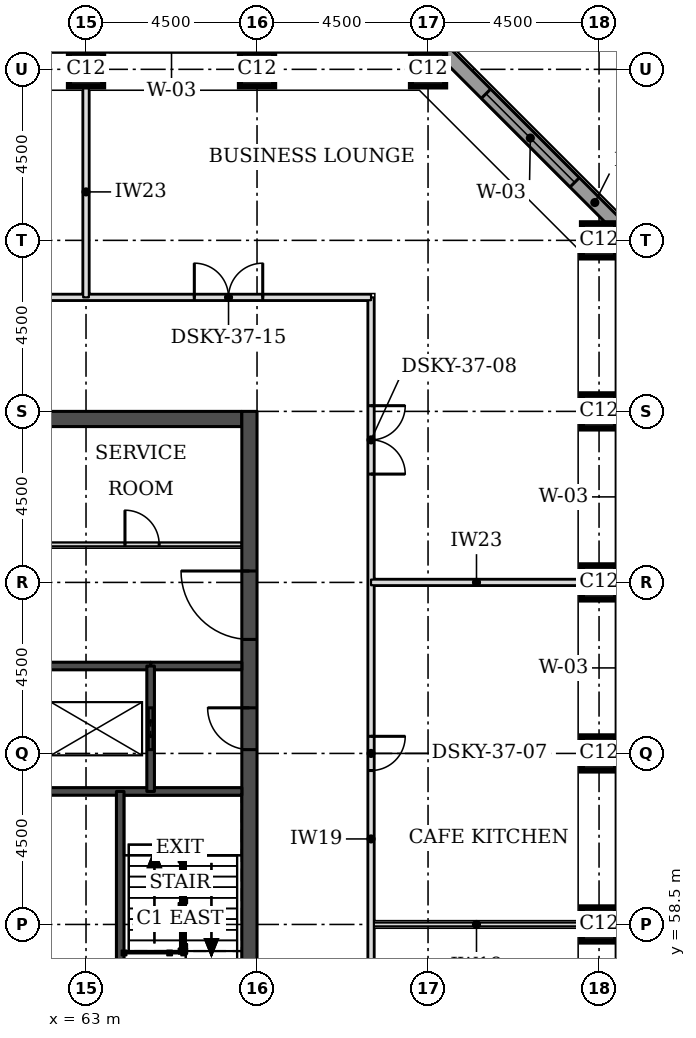
"""IFC4 building model, lengths in metres.
Left out: names, types, materials, properties, quantities, classifications, styles, units other than length and angle.
Written with IfcOpenShell. Run it as: python <this file> out.ifc"""

import sys

from ifc_helpers import new_model, si_unit, direction, frame, frame_2d, origin, origin_2d, place, context, subcontext, project, spatial, rectangle, extrude, element, fill, save


model = new_model("IFC4")
c1 = context("Model", 3, precision=1e-05, world=origin(), true_north=direction((0.0, 1.0)))
c2 = subcontext(c1, "Body", "Model", "MODEL_VIEW")
j1 = project(units=[si_unit("LENGTHUNIT", "METRE"), si_unit("PLANEANGLEUNIT", "RADIAN")], contexts=[c1])
p1 = place(None, origin())
s1 = spatial("IfcSite", under=j1, at=p1, CompositionType="ELEMENT")
p2 = place(p1, origin())
s2 = spatial("IfcBuilding", under=s1, at=p2, CompositionType="ELEMENT")
p3 = place(p2, frame((0.0, 0.0, 143.1)))
s3 = spatial("IfcBuildingStorey", under=s2, at=p3, CompositionType="ELEMENT", Elevation=143.1)
for number, where, z_axis, x_axis in (
    (1, (76.5, 58.5, 0.0), (0.0, 0.0, 1.0), (1.0, 0.0, 0.0)),
    (2, (76.5, 63.0, 0.0), (0.0, 0.0, 1.0), (1.0, 0.0, 0.0)),
    (3, (76.5, 67.5, 0.0), (0.0, 0.0, 1.0), (1.0, 0.0, 0.0)),
    (4, (76.5, 72.0, 0.0), (0.0, 0.0, 1.0), (1.0, 0.0, 0.0)),
    (5, (76.5, 76.5, 0.0), (0.0, 0.0, 1.0), (1.0, 0.0, 0.0)),
    (6, (63.0, 81.0, 0.0), (0.0, 0.0, 1.0), (1.0, 0.0, 0.0)),
    (7, (67.5, 81.0, 0.0), (0.0, 0.0, 1.0), (1.0, 0.0, 0.0)),
    (8, (72.0, 81.0, 0.0), (0.0, 0.0, 1.0), (1.0, 0.0, 0.0)),
):
    element("IfcColumn", number, at=place(p3, frame(where, z_axis=z_axis, x_axis=x_axis)), inside=s3, PredefinedType="COLUMN", context=c2, shape_type="SweptSolid", body=[
        extrude(rectangle(XDim=0.9, YDim=0.9, at=origin_2d()), origin(), (0.0, 0.0, 1.0), 4.6),
    ])
p4 = place(p3, frame((45.4, 71.8, 0.0), z_axis=(0.0, 0.0, 1.0), x_axis=(1.0, 0.0, 0.0)))
e9 = element("IfcWall", 9, at=p4, inside=s3, PredefinedType="SHEAR", context=c2, shape_type="SweptSolid", body=[
    extrude(rectangle(XDim=21.7, YDim=0.4, at=frame_2d((10.85, 0.0))), origin(), (0.0, 0.0, 1.0), 4.6),
])
p5 = place(p3, frame((67.3, 49.5, 0.0), z_axis=(0.0, 0.0, 1.0), x_axis=(0.0, 1.0, 0.0)))
e10 = element("IfcWall", 10, at=p5, inside=s3, PredefinedType="SHEAR", context=c2, shape_type="SweptSolid", body=[
    extrude(rectangle(XDim=22.5, YDim=0.4, at=frame_2d((11.25, 0.0))), origin(), (0.0, 0.0, 1.0), 4.6),
])
p6 = place(p5, frame((4.2, 0.0, 0.0)))
e11 = element("IfcOpeningElement", 11, at=p6, cuts=e10, PredefinedType="OPENING", context=c2, shape_type="SweptSolid", body=[
    extrude(rectangle(XDim=1.8, YDim=2.1, at=frame_2d((0.9, 1.05))), frame((0.0, 0.21, 0.0), z_axis=(0.0, -1.0, 0.0), x_axis=(1.0, 0.0, 0.0)), (0.0, 0.0, 1.0), 0.42),
])
p7 = place(p5, frame((6.9, 0.0, 0.0)))
e12 = element("IfcOpeningElement", 12, at=p7, cuts=e10, PredefinedType="OPENING", context=c2, shape_type="SweptSolid", body=[
    extrude(rectangle(XDim=1.1, YDim=2.1, at=frame_2d((0.55, 1.05))), frame((0.0, 0.21, 0.0), z_axis=(0.0, -1.0, 0.0), x_axis=(1.0, 0.0, 0.0)), (0.0, 0.0, 1.0), 0.42),
])
p8 = place(p5, frame((13.6, 0.0, 0.0)))
e13 = element("IfcOpeningElement", 13, at=p8, cuts=e10, PredefinedType="OPENING", context=c2, shape_type="SweptSolid", body=[
    extrude(rectangle(XDim=1.1, YDim=2.1, at=frame_2d((0.55, 1.05))), frame((0.0, 0.21, 0.0), z_axis=(0.0, -1.0, 0.0), x_axis=(1.0, 0.0, 0.0)), (0.0, 0.0, 1.0), 0.42),
])
p9 = place(p5, frame((16.5, 0.0, 0.0)))
e14 = element("IfcOpeningElement", 14, at=p9, cuts=e10, PredefinedType="OPENING", context=c2, shape_type="SweptSolid", body=[
    extrude(rectangle(XDim=1.8, YDim=2.1, at=frame_2d((0.9, 1.05))), frame((0.0, 0.21, 0.0), z_axis=(0.0, -1.0, 0.0), x_axis=(1.0, 0.0, 0.0)), (0.0, 0.0, 1.0), 0.42),
])
p10 = place(p3, frame((77.176, 76.708, 0.0), z_axis=(0.0, 0.0, 1.0), x_axis=(-0.707106781187, 0.707106781187, 0.0)))
e15 = element("IfcWall", 15, at=p10, inside=s3, PredefinedType="STANDARD", context=c2, shape_type="SweptSolid", body=[
    extrude(rectangle(XDim=7.027, YDim=0.35, at=frame_2d((3.513, 0.0))), origin(), (0.0, 0.0, 1.0), 4.425),
])
p11 = place(p10, frame((1.863, 0.0, 0.9)))
e16 = element("IfcOpeningElement", 16, at=p11, cuts=e15, PredefinedType="OPENING", context=c2, shape_type="SweptSolid", body=[
    extrude(rectangle(XDim=3.3, YDim=2.7, at=frame_2d((1.65, 1.35))), frame((0.0, 0.185, 0.0), z_axis=(0.0, -1.0, 0.0), x_axis=(1.0, 0.0, 0.0)), (0.0, 0.0, 1.0), 0.37),
])
p12 = place(p3, frame((70.5, 58.5, 0.0), z_axis=(0.0, 0.0, 1.0), x_axis=(1.0, 0.0, 0.0)))
e17 = element("IfcWall", 17, at=p12, inside=s3, PredefinedType="PARTITIONING", context=c2, shape_type="SweptSolid", body=[
    extrude(rectangle(XDim=5.55, YDim=0.1, at=frame_2d((2.775, 0.0))), origin(), (0.0, 0.0, 1.0), 4.45),
])
p13 = place(p3, frame((70.5, 46.5, 0.0), z_axis=(0.0, 0.0, 1.0), x_axis=(0.0, 1.0, 0.0)))
e18 = element("IfcWall", 18, at=p13, inside=s3, PredefinedType="PARTITIONING", context=c2, shape_type="SweptSolid", body=[
    extrude(rectangle(XDim=28.5, YDim=0.15, at=frame_2d((14.25, 0.0))), origin(), (0.0, 0.0, 1.0), 4.45),
])
p14 = place(p13, frame((7.05, 0.0, 0.0)))
e19 = element("IfcOpeningElement", 19, at=p14, cuts=e18, PredefinedType="OPENING", context=c2, shape_type="SweptSolid", body=[
    extrude(rectangle(XDim=0.9, YDim=2.1, at=frame_2d((0.45, 1.05))), frame((0.0, 0.085, 0.0), z_axis=(0.0, -1.0, 0.0), x_axis=(1.0, 0.0, 0.0)), (0.0, 0.0, 1.0), 0.17),
])
p15 = place(p13, frame((16.05, 0.0, 0.0)))
e20 = element("IfcOpeningElement", 20, at=p15, cuts=e18, PredefinedType="OPENING", context=c2, shape_type="SweptSolid", body=[
    extrude(rectangle(XDim=0.9, YDim=2.1, at=frame_2d((0.45, 1.05))), frame((0.0, 0.085, 0.0), z_axis=(0.0, -1.0, 0.0), x_axis=(1.0, 0.0, 0.0)), (0.0, 0.0, 1.0), 0.17),
])
p16 = place(p13, frame((23.85, 0.0, 0.0)))
e21 = element("IfcOpeningElement", 21, at=p16, cuts=e18, PredefinedType="OPENING", context=c2, shape_type="SweptSolid", body=[
    extrude(rectangle(XDim=1.8, YDim=2.4, at=frame_2d((0.9, 1.2))), frame((0.0, 0.085, 0.0), z_axis=(0.0, -1.0, 0.0), x_axis=(1.0, 0.0, 0.0)), (0.0, 0.0, 1.0), 0.17),
])
p17 = place(p3, frame((42.0, 75.0, 0.0), z_axis=(0.0, 0.0, 1.0), x_axis=(1.0, 0.0, 0.0)))
e22 = element("IfcWall", 22, at=p17, inside=s3, PredefinedType="PARTITIONING", context=c2, shape_type="SweptSolid", body=[
    extrude(rectangle(XDim=28.5, YDim=0.15, at=frame_2d((14.25, 0.0))), origin(), (0.0, 0.0, 1.0), 4.45),
])
p18 = place(p17, frame((23.85, 0.0, 0.0)))
e23 = element("IfcOpeningElement", 23, at=p18, cuts=e22, PredefinedType="OPENING", context=c2, shape_type="SweptSolid", body=[
    extrude(rectangle(XDim=1.8, YDim=2.4, at=frame_2d((0.9, 1.2))), frame((0.0, 0.085, 0.0), z_axis=(0.0, -1.0, 0.0), x_axis=(1.0, 0.0, 0.0)), (0.0, 0.0, 1.0), 0.17),
])
p19 = place(p17, frame((7.05, 0.0, 0.0)))
e24 = element("IfcOpeningElement", 24, at=p19, cuts=e22, PredefinedType="OPENING", context=c2, shape_type="SweptSolid", body=[
    extrude(rectangle(XDim=0.9, YDim=2.1, at=frame_2d((0.45, 1.05))), frame((0.0, 0.085, 0.0), z_axis=(0.0, -1.0, 0.0), x_axis=(1.0, 0.0, 0.0)), (0.0, 0.0, 1.0), 0.17),
])
p20 = place(p17, frame((16.05, 0.0, 0.0)))
e25 = element("IfcOpeningElement", 25, at=p20, cuts=e22, PredefinedType="OPENING", context=c2, shape_type="SweptSolid", body=[
    extrude(rectangle(XDim=0.9, YDim=2.1, at=frame_2d((0.45, 1.05))), frame((0.0, 0.085, 0.0), z_axis=(0.0, -1.0, 0.0), x_axis=(1.0, 0.0, 0.0)), (0.0, 0.0, 1.0), 0.17),
])
for number, where, z_axis, x_axis in (
    (26, (70.5, 67.5, 0.0), (0.0, 0.0, 1.0), (1.0, 0.0, 0.0)),
    (27, (63.0, 75.0, 0.0), (0.0, 0.0, 1.0), (0.0, 1.0, 0.0)),
):
    element("IfcWall", number, at=place(p3, frame(where, z_axis=z_axis, x_axis=x_axis)), inside=s3, PredefinedType="PARTITIONING", context=c2, shape_type="SweptSolid", body=[
        extrude(rectangle(XDim=5.55, YDim=0.15, at=frame_2d((2.775, 0.0))), origin(), (0.0, 0.0, 1.0), 4.45),
    ])
p21 = place(p3, frame((61.85, 62.0, 0.0), z_axis=(0.0, 0.0, 1.0), x_axis=(1.0, 0.0, 0.0)))
e28 = element("IfcWall", 28, at=p21, inside=s3, PredefinedType="SOLIDWALL", context=c2, shape_type="SweptSolid", body=[
    extrude(rectangle(XDim=5.25, YDim=0.2, at=frame_2d((2.625, 0.0))), origin(), (0.0, 0.0, 1.0), 4.45),
])
p22 = place(p3, frame((64.7, 65.3, 0.0), z_axis=(0.0, 0.0, 1.0), x_axis=(1.0, 0.0, 0.0)))
e29 = element("IfcWall", 29, at=p22, inside=s3, PredefinedType="SOLIDWALL", context=c2, shape_type="SweptSolid", body=[
    extrude(rectangle(XDim=2.4, YDim=0.2, at=frame_2d((1.2, 0.0))), origin(), (0.0, 0.0, 1.0), 4.45),
])
p23 = place(p3, frame((47.8, 65.3, 0.0), z_axis=(0.0, 0.0, 1.0), x_axis=(1.0, 0.0, 0.0)))
e30 = element("IfcWall", 30, at=p23, inside=s3, PredefinedType="SOLIDWALL", context=c2, shape_type="SweptSolid", body=[
    extrude(rectangle(XDim=16.9, YDim=0.2, at=frame_2d((8.45, 0.0))), origin(), (0.0, 0.0, 1.0), 4.45),
])
p24 = place(p23, frame((3.65, 0.0, 0.0)))
e31 = element("IfcOpeningElement", 31, at=p24, cuts=e30, PredefinedType="OPENING", context=c2, shape_type="SweptSolid", body=[
    extrude(rectangle(XDim=1.2, YDim=2.1, at=frame_2d((0.6, 1.05))), frame((0.0, 0.11, 0.0), z_axis=(0.0, -1.0, 0.0), x_axis=(1.0, 0.0, 0.0)), (0.0, 0.0, 1.0), 0.22),
])
p25 = place(p23, frame((6.45, 0.0, 0.0)))
e32 = element("IfcOpeningElement", 32, at=p25, cuts=e30, PredefinedType="OPENING", context=c2, shape_type="SweptSolid", body=[
    extrude(rectangle(XDim=1.2, YDim=2.1, at=frame_2d((0.6, 1.05))), frame((0.0, 0.11, 0.0), z_axis=(0.0, -1.0, 0.0), x_axis=(1.0, 0.0, 0.0)), (0.0, 0.0, 1.0), 0.22),
])
p26 = place(p23, frame((9.25, 0.0, 0.0)))
e33 = element("IfcOpeningElement", 33, at=p26, cuts=e30, PredefinedType="OPENING", context=c2, shape_type="SweptSolid", body=[
    extrude(rectangle(XDim=1.2, YDim=2.1, at=frame_2d((0.6, 1.05))), frame((0.0, 0.11, 0.0), z_axis=(0.0, -1.0, 0.0), x_axis=(1.0, 0.0, 0.0)), (0.0, 0.0, 1.0), 0.22),
])
p27 = place(p23, frame((12.05, 0.0, 0.0)))
e34 = element("IfcOpeningElement", 34, at=p27, cuts=e30, PredefinedType="OPENING", context=c2, shape_type="SweptSolid", body=[
    extrude(rectangle(XDim=1.2, YDim=2.1, at=frame_2d((0.6, 1.05))), frame((0.0, 0.11, 0.0), z_axis=(0.0, -1.0, 0.0), x_axis=(1.0, 0.0, 0.0)), (0.0, 0.0, 1.0), 0.22),
])
p28 = place(p3, frame((61.85, 68.5, 0.0), z_axis=(0.0, 0.0, 1.0), x_axis=(1.0, 0.0, 0.0)))
e35 = element("IfcWall", 35, at=p28, inside=s3, PredefinedType="PARTITIONING", context=c2, shape_type="SweptSolid", body=[
    extrude(rectangle(XDim=5.25, YDim=0.1, at=frame_2d((2.625, 0.0))), origin(), (0.0, 0.0, 1.0), 4.45),
])
p29 = place(p28, frame((2.175, 0.0, 0.0)))
e36 = element("IfcOpeningElement", 36, at=p29, cuts=e35, PredefinedType="OPENING", context=c2, shape_type="SweptSolid", body=[
    extrude(rectangle(XDim=0.9, YDim=2.1, at=frame_2d((0.45, 1.05))), frame((0.0, 0.06, 0.0), z_axis=(0.0, -1.0, 0.0), x_axis=(1.0, 0.0, 0.0)), (0.0, 0.0, 1.0), 0.12),
])
p30 = place(p3, frame((63.9, 56.2, 0.0), z_axis=(0.0, 0.0, 1.0), x_axis=(0.0, 1.0, 0.0)))
e37 = element("IfcWall", 37, at=p30, inside=s3, PredefinedType="SOLIDWALL", context=c2, shape_type="SweptSolid", body=[
    extrude(rectangle(XDim=5.8, YDim=0.2, at=frame_2d((2.9, 0.0))), origin(), (0.0, 0.0, 1.0), 4.45),
])
p31 = place(p3, frame((64.7, 62.0, 0.0), z_axis=(0.0, 0.0, 1.0), x_axis=(0.0, 1.0, 0.0)))
e38 = element("IfcWall", 38, at=p31, inside=s3, PredefinedType="SOLIDWALL", context=c2, shape_type="SweptSolid", body=[
    extrude(rectangle(XDim=3.3, YDim=0.2, at=frame_2d((1.65, 0.0))), origin(), (0.0, 0.0, 1.0), 4.45),
])
p32 = place(p31, frame((1.1, 0.0, 0.0)))
e39 = element("IfcOpeningElement", 39, at=p32, cuts=e38, PredefinedType="OPENING", context=c2, shape_type="SweptSolid", body=[
    extrude(rectangle(XDim=1.1, YDim=2.1, at=frame_2d((0.55, 1.05))), frame((0.0, 0.11, 0.0), z_axis=(0.0, -1.0, 0.0), x_axis=(1.0, 0.0, 0.0)), (0.0, 0.0, 1.0), 0.22),
])
p33 = place(p11, origin())
e40 = element("IfcWindow", 40, at=p33, inside=s3, PartitioningType="SINGLE_PANEL", PredefinedType="WINDOW", context=c2, shape_type="SweptSolid", body=[
    extrude(rectangle(XDim=3.3, YDim=2.7, at=frame_2d((1.65, 1.35))), frame((0.0, 0.085, 0.0), z_axis=(0.0, -1.0, 0.0), x_axis=(1.0, 0.0, 0.0)), (0.0, 0.0, 1.0), 0.06),
])
fill(e16, e40)
p34 = place(p15, frame((0.9, 0.0, 0.0), z_axis=(0.0, 0.0, 1.0), x_axis=(-1.0, 0.0, 0.0)))
e41 = element("IfcDoor", 41, at=p34, inside=s3, OperationType="SINGLE_SWING_LEFT", PredefinedType="DOOR", context=c2, shape_type="SweptSolid", body=[
    extrude(rectangle(XDim=0.9, YDim=2.1, at=frame_2d((0.45, 1.05))), frame((0.0, 0.025, 0.0), z_axis=(0.0, -1.0, 0.0), x_axis=(1.0, 0.0, 0.0)), (0.0, 0.0, 1.0), 0.05),
])
fill(e20, e41)
p35 = place(p16, frame((1.8, 0.0, 0.0), z_axis=(0.0, 0.0, 1.0), x_axis=(-1.0, 0.0, 0.0)))
e42 = element("IfcDoor", 42, at=p35, inside=s3, OperationType="DOUBLE_DOOR_SINGLE_SWING", PredefinedType="DOOR", context=c2, shape_type="SweptSolid", body=[
    extrude(rectangle(XDim=1.8, YDim=2.4, at=frame_2d((0.9, 1.2))), frame((0.0, 0.025, 0.0), z_axis=(0.0, -1.0, 0.0), x_axis=(1.0, 0.0, 0.0)), (0.0, 0.0, 1.0), 0.05),
])
fill(e21, e42)
p36 = place(p18, origin())
e43 = element("IfcDoor", 43, at=p36, inside=s3, OperationType="DOUBLE_DOOR_SINGLE_SWING", PredefinedType="DOOR", context=c2, shape_type="SweptSolid", body=[
    extrude(rectangle(XDim=1.8, YDim=2.4, at=frame_2d((0.9, 1.2))), frame((0.0, 0.025, 0.0), z_axis=(0.0, -1.0, 0.0), x_axis=(1.0, 0.0, 0.0)), (0.0, 0.0, 1.0), 0.05),
])
fill(e23, e43)
p37 = place(p32, origin())
e44 = element("IfcDoor", 44, at=p37, inside=s3, OperationType="DOUBLE_DOOR_SLIDING", PredefinedType="DOOR", context=c2, shape_type="SweptSolid", body=[
    extrude(rectangle(XDim=1.1, YDim=2.1, at=frame_2d((0.55, 1.05))), frame((0.0, 0.025, 0.0), z_axis=(0.0, -1.0, 0.0), x_axis=(1.0, 0.0, 0.0)), (0.0, 0.0, 1.0), 0.05),
])
fill(e39, e44)
p38 = place(p8, origin())
e45 = element("IfcDoor", 45, at=p38, inside=s3, OperationType="SINGLE_SWING_RIGHT", PredefinedType="DOOR", context=c2, shape_type="SweptSolid", body=[
    extrude(rectangle(XDim=1.1, YDim=2.1, at=frame_2d((0.55, 1.05))), frame((0.0, 0.025, 0.0), z_axis=(0.0, -1.0, 0.0), x_axis=(1.0, 0.0, 0.0)), (0.0, 0.0, 1.0), 0.05),
])
fill(e13, e45)
p39 = place(p9, origin())
e46 = element("IfcDoor", 46, at=p39, inside=s3, OperationType="SINGLE_SWING_RIGHT", PredefinedType="DOOR", context=c2, shape_type="SweptSolid", body=[
    extrude(rectangle(XDim=1.8, YDim=2.1, at=frame_2d((0.9, 1.05))), frame((0.0, 0.025, 0.0), z_axis=(0.0, -1.0, 0.0), x_axis=(1.0, 0.0, 0.0)), (0.0, 0.0, 1.0), 0.05),
])
fill(e14, e46)
p40 = place(p29, origin())
e47 = element("IfcDoor", 47, at=p40, inside=s3, OperationType="SINGLE_SWING_LEFT", PredefinedType="DOOR", context=c2, shape_type="SweptSolid", body=[
    extrude(rectangle(XDim=0.9, YDim=2.1, at=frame_2d((0.45, 1.05))), frame((0.0, 0.025, 0.0), z_axis=(0.0, -1.0, 0.0), x_axis=(1.0, 0.0, 0.0)), (0.0, 0.0, 1.0), 0.05),
])
fill(e36, e47)
save(model, sys.argv[1])
